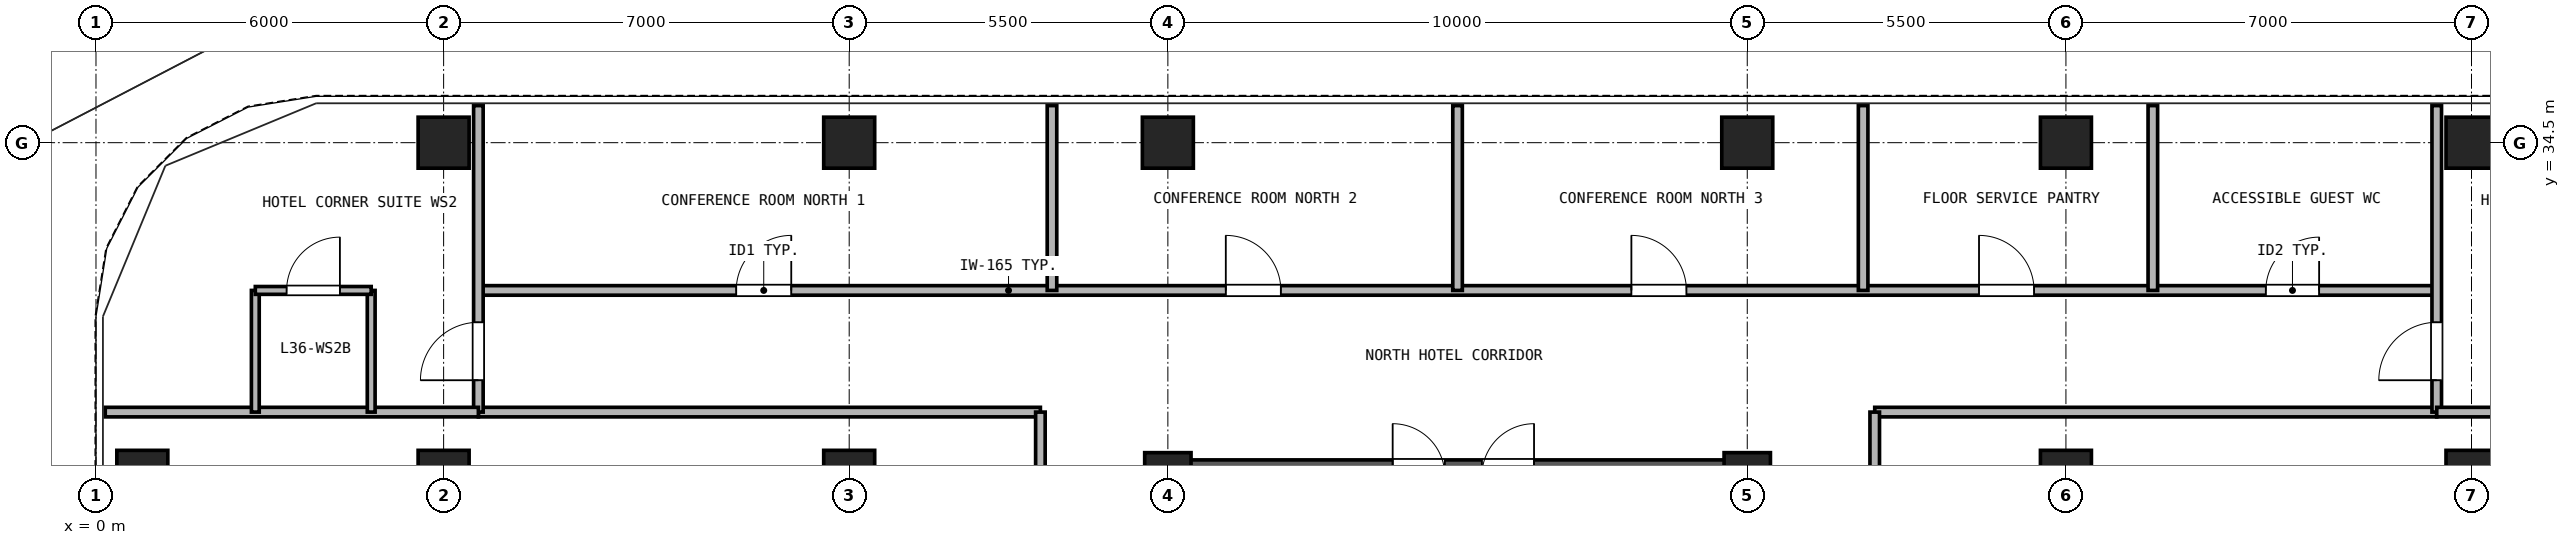
"""IFC4 building model, lengths in metres.
Left out: names, types, materials, properties, quantities, classifications, styles, units other than length and angle.
Written with IfcOpenShell. Run it as: python <this file> out.ifc"""

import sys

from ifc_helpers import new_model, si_unit, direction, frame, frame_2d, origin, origin_2d, place, context, subcontext, project, spatial, rectangle, hollow_rectangle, extrude, source, transform, mapped, element, fill, save


model = new_model("IFC4")
c1 = context("Model", 3, precision=1e-05, world=origin(), true_north=direction((0.0, 1.0)))
c2 = subcontext(c1, "Body", "Model", "MODEL_VIEW")
j1 = project(units=[si_unit("LENGTHUNIT", "METRE"), si_unit("PLANEANGLEUNIT", "RADIAN")], contexts=[c1])
p1 = place(None, origin())
s1 = spatial("IfcSite", under=j1, at=p1, CompositionType="ELEMENT")
p2 = place(p1, origin())
s2 = spatial("IfcBuilding", under=s1, at=p2, CompositionType="ELEMENT")
p3 = place(p2, frame((0.0, 0.0, 131.1)))
s3 = spatial("IfcBuildingStorey", under=s2, at=p3, CompositionType="ELEMENT", Elevation=131.1)
m1 = source(origin(), c2, "Body", "SweptSolid", [
    extrude(hollow_rectangle(XDim=0.88, YDim=0.88, WallThickness=0.05, at=origin_2d()), origin(), (0.0, 0.0, 1.0), 2.95),
])
for number, where, z_axis, x_axis in (
    (1, (6.0, 34.5, 0.0), (0.0, 0.0, 1.0), (1.0, 0.0, 0.0)),
    (2, (13.0, 34.5, 0.0), (0.0, 0.0, 1.0), (1.0, 0.0, 0.0)),
    (3, (18.5, 34.5, 0.0), (0.0, 0.0, 1.0), (1.0, 0.0, 0.0)),
    (4, (28.5, 34.5, 0.0), (0.0, 0.0, 1.0), (1.0, 0.0, 0.0)),
    (5, (34.0, 34.5, 0.0), (0.0, 0.0, 1.0), (1.0, 0.0, 0.0)),
    (6, (41.0, 34.5, 0.0), (0.0, 0.0, 1.0), (1.0, 0.0, 0.0)),
    (7, (0.8, 28.75, 0.0), (0.0, 0.0, 1.0), (1.0, 0.0, 0.0)),
    (8, (6.0, 28.75, 0.0), (0.0, 0.0, 1.0), (1.0, 0.0, 0.0)),
    (9, (13.0, 28.75, 0.0), (0.0, 0.0, 1.0), (1.0, 0.0, 0.0)),
):
    element("IfcColumn", number, at=place(p3, frame(where, z_axis=z_axis, x_axis=x_axis)), inside=s3, PredefinedType="COLUMN", context=c2, shape_type="MappedRepresentation", body=[
        mapped(m1, transform((0.0, 0.0, 0.0), x_axis=(1.0, 0.0, 0.0), y_axis=(0.0, 1.0, 0.0), z_axis=(0.0, 0.0, 1.0), scale=1.0)),
    ])
m2 = source(origin(), c2, "Body", "SweptSolid", [
    extrude(hollow_rectangle(XDim=0.8, YDim=0.8, WallThickness=0.045, at=origin_2d()), origin(), (0.0, 0.0, 1.0), 2.95),
])
for number, where, z_axis, x_axis in (
    (10, (18.5, 28.75, 0.0), (0.0, 0.0, 1.0), (1.0, 0.0, 0.0)),
    (11, (28.5, 28.75, 0.0), (0.0, 0.0, 1.0), (1.0, 0.0, 0.0)),
):
    element("IfcColumn", number, at=place(p3, frame(where, z_axis=z_axis, x_axis=x_axis)), inside=s3, PredefinedType="COLUMN", context=c2, shape_type="MappedRepresentation", body=[
        mapped(m2, transform((0.0, 0.0, 0.0), x_axis=(1.0, 0.0, 0.0), y_axis=(0.0, 1.0, 0.0), z_axis=(0.0, 0.0, 1.0), scale=1.0)),
    ])
for number, where, z_axis, x_axis in (
    (12, (34.0, 28.75, 0.0), (0.0, 0.0, 1.0), (1.0, 0.0, 0.0)),
    (13, (41.0, 28.75, 0.0), (0.0, 0.0, 1.0), (1.0, 0.0, 0.0)),
):
    element("IfcColumn", number, at=place(p3, frame(where, z_axis=z_axis, x_axis=x_axis)), inside=s3, PredefinedType="COLUMN", context=c2, shape_type="MappedRepresentation", body=[
        mapped(m1, transform((0.0, 0.0, 0.0), x_axis=(1.0, 0.0, 0.0), y_axis=(0.0, 1.0, 0.0), z_axis=(0.0, 0.0, 1.0), scale=1.0)),
    ])
p4 = place(p3, frame((18.225, 28.75, 0.0), z_axis=(0.0, 0.0, 1.0), x_axis=(1.0, 0.0, 0.0)))
e14 = element("IfcWall", 14, at=p4, inside=s3, PredefinedType="SHEAR", context=c2, shape_type="SweptSolid", body=[
    extrude(rectangle(XDim=10.55, YDim=0.55, at=frame_2d((5.275, 0.0))), origin(), (0.0, 0.0, 1.0), 2.95),
])
p5 = place(p4, frame((4.155, 0.0, 0.0)))
e15 = element("IfcOpeningElement", 15, at=p5, cuts=e14, PredefinedType="OPENING", context=c2, shape_type="SweptSolid", body=[
    extrude(rectangle(XDim=0.9, YDim=2.05, at=frame_2d((0.45, 1.025))), frame((0.0, 0.285, 0.0), z_axis=(0.0, -1.0, 0.0), x_axis=(1.0, 0.0, 0.0)), (0.0, 0.0, 1.0), 0.57),
])
p6 = place(p4, frame((5.695, 0.0, 0.0)))
e16 = element("IfcOpeningElement", 16, at=p6, cuts=e14, PredefinedType="OPENING", context=c2, shape_type="SweptSolid", body=[
    extrude(rectangle(XDim=0.9, YDim=2.05, at=frame_2d((0.45, 1.025))), frame((0.0, 0.285, 0.0), z_axis=(0.0, -1.0, 0.0), x_axis=(1.0, 0.0, 0.0)), (0.0, 0.0, 1.0), 0.57),
])
p7 = place(p3, frame((6.6, 31.95, 0.0), z_axis=(0.0, 0.0, 1.0), x_axis=(1.0, 0.0, 0.0)))
e17 = element("IfcWall", 17, at=p7, inside=s3, PredefinedType="PARTITIONING", context=c2, shape_type="SweptSolid", body=[
    extrude(rectangle(XDim=33.8, YDim=0.165, at=frame_2d((16.9, 0.0))), origin(), (0.0, 0.0, 1.0), 2.95),
])
p8 = place(p7, frame((4.45, 0.0, 0.0)))
e18 = element("IfcOpeningElement", 18, at=p8, cuts=e17, PredefinedType="OPENING", context=c2, shape_type="SweptSolid", body=[
    extrude(rectangle(XDim=0.95, YDim=2.15, at=frame_2d((0.475, 1.075))), frame((0.0, 0.093, 0.0), z_axis=(0.0, -1.0, 0.0), x_axis=(1.0, 0.0, 0.0)), (0.0, 0.0, 1.0), 0.185),
])
p9 = place(p7, frame((12.9, 0.0, 0.0)))
e19 = element("IfcOpeningElement", 19, at=p9, cuts=e17, PredefinedType="OPENING", context=c2, shape_type="SweptSolid", body=[
    extrude(rectangle(XDim=0.95, YDim=2.15, at=frame_2d((0.475, 1.075))), frame((0.0, 0.093, 0.0), z_axis=(0.0, -1.0, 0.0), x_axis=(1.0, 0.0, 0.0)), (0.0, 0.0, 1.0), 0.185),
])
p10 = place(p7, frame((19.9, 0.0, 0.0)))
e20 = element("IfcOpeningElement", 20, at=p10, cuts=e17, PredefinedType="OPENING", context=c2, shape_type="SweptSolid", body=[
    extrude(rectangle(XDim=0.95, YDim=2.15, at=frame_2d((0.475, 1.075))), frame((0.0, 0.093, 0.0), z_axis=(0.0, -1.0, 0.0), x_axis=(1.0, 0.0, 0.0)), (0.0, 0.0, 1.0), 0.185),
])
p11 = place(p7, frame((25.9, 0.0, 0.0)))
e21 = element("IfcOpeningElement", 21, at=p11, cuts=e17, PredefinedType="OPENING", context=c2, shape_type="SweptSolid", body=[
    extrude(rectangle(XDim=0.95, YDim=2.15, at=frame_2d((0.475, 1.075))), frame((0.0, 0.093, 0.0), z_axis=(0.0, -1.0, 0.0), x_axis=(1.0, 0.0, 0.0)), (0.0, 0.0, 1.0), 0.185),
])
p12 = place(p7, frame((30.85, 0.0, 0.0)))
e22 = element("IfcOpeningElement", 22, at=p12, cuts=e17, PredefinedType="OPENING", context=c2, shape_type="SweptSolid", body=[
    extrude(rectangle(XDim=0.92, YDim=2.1, at=frame_2d((0.46, 1.05))), frame((0.0, 0.093, 0.0), z_axis=(0.0, -1.0, 0.0), x_axis=(1.0, 0.0, 0.0)), (0.0, 0.0, 1.0), 0.185),
])
for number, where, z_axis, x_axis in (
    (23, (6.6, 29.85, 0.0), (0.0, 0.0, 1.0), (1.0, 0.0, 0.0)),
    (24, (30.7, 29.85, 0.0), (0.0, 0.0, 1.0), (1.0, 0.0, 0.0)),
):
    element("IfcWall", number, at=place(p3, frame(where, z_axis=z_axis, x_axis=x_axis)), inside=s3, PredefinedType="PARTITIONING", context=c2, shape_type="SweptSolid", body=[
        extrude(rectangle(XDim=9.7, YDim=0.165, at=frame_2d((4.85, 0.0))), origin(), (0.0, 0.0, 1.0), 2.95),
    ])
p13 = place(p3, frame((16.3, 11.15, 0.0), z_axis=(0.0, 0.0, 1.0), x_axis=(0.0, 1.0, 0.0)))
e25 = element("IfcWall", 25, at=p13, inside=s3, PredefinedType="PARTITIONING", context=c2, shape_type="SweptSolid", body=[
    extrude(rectangle(XDim=18.7, YDim=0.165, at=frame_2d((9.35, 0.0))), origin(), (0.0, 0.0, 1.0), 2.95),
])
p14 = place(p13, frame((2.75, 0.0, 0.0)))
e26 = element("IfcOpeningElement", 26, at=p14, cuts=e25, PredefinedType="OPENING", context=c2, shape_type="SweptSolid", body=[
    extrude(rectangle(XDim=0.95, YDim=2.15, at=frame_2d((0.475, 1.075))), frame((0.0, 0.093, 0.0), z_axis=(0.0, -1.0, 0.0), x_axis=(1.0, 0.0, 0.0)), (0.0, 0.0, 1.0), 0.185),
])
p15 = place(p13, frame((12.1, 0.0, 0.0)))
e27 = element("IfcOpeningElement", 27, at=p15, cuts=e25, PredefinedType="OPENING", context=c2, shape_type="SweptSolid", body=[
    extrude(rectangle(XDim=0.95, YDim=2.15, at=frame_2d((0.475, 1.075))), frame((0.0, 0.093, 0.0), z_axis=(0.0, -1.0, 0.0), x_axis=(1.0, 0.0, 0.0)), (0.0, 0.0, 1.0), 0.185),
])
p16 = place(p3, frame((30.7, 11.15, 0.0), z_axis=(0.0, 0.0, 1.0), x_axis=(0.0, 1.0, 0.0)))
e28 = element("IfcWall", 28, at=p16, inside=s3, PredefinedType="PARTITIONING", context=c2, shape_type="SweptSolid", body=[
    extrude(rectangle(XDim=18.7, YDim=0.165, at=frame_2d((9.35, 0.0))), origin(), (0.0, 0.0, 1.0), 2.95),
])
p17 = place(p16, frame((4.175, 0.0, 0.0)))
e29 = element("IfcOpeningElement", 29, at=p17, cuts=e28, PredefinedType="OPENING", context=c2, shape_type="SweptSolid", body=[
    extrude(rectangle(XDim=0.95, YDim=2.15, at=frame_2d((0.475, 1.075))), frame((0.0, 0.093, 0.0), z_axis=(0.0, -1.0, 0.0), x_axis=(1.0, 0.0, 0.0)), (0.0, 0.0, 1.0), 0.185),
])
p18 = place(p16, frame((13.525, 0.0, 0.0)))
e30 = element("IfcOpeningElement", 30, at=p18, cuts=e28, PredefinedType="OPENING", context=c2, shape_type="SweptSolid", body=[
    extrude(rectangle(XDim=0.95, YDim=2.15, at=frame_2d((0.475, 1.075))), frame((0.0, 0.093, 0.0), z_axis=(0.0, -1.0, 0.0), x_axis=(1.0, 0.0, 0.0)), (0.0, 0.0, 1.0), 0.185),
])
p19 = place(p3, frame((6.6, 29.85, 0.0), z_axis=(0.0, 0.0, 1.0), x_axis=(0.0, 1.0, 0.0)))
e31 = element("IfcWall", 31, at=p19, inside=s3, PredefinedType="PARTITIONING", context=c2, shape_type="SweptSolid", body=[
    extrude(rectangle(XDim=5.29, YDim=0.165, at=frame_2d((2.645, 0.0))), origin(), (0.0, 0.0, 1.0), 2.95),
])
p20 = place(p19, frame((0.55, 0.0, 0.0)))
e32 = element("IfcOpeningElement", 32, at=p20, cuts=e31, PredefinedType="OPENING", context=c2, shape_type="SweptSolid", body=[
    extrude(rectangle(XDim=1.0, YDim=2.15, at=frame_2d((0.5, 1.075))), frame((0.0, 0.093, 0.0), z_axis=(0.0, -1.0, 0.0), x_axis=(1.0, 0.0, 0.0)), (0.0, 0.0, 1.0), 0.185),
])
p21 = place(p3, frame((40.4, 29.85, 0.0), z_axis=(0.0, 0.0, 1.0), x_axis=(0.0, 1.0, 0.0)))
e33 = element("IfcWall", 33, at=p21, inside=s3, PredefinedType="PARTITIONING", context=c2, shape_type="SweptSolid", body=[
    extrude(rectangle(XDim=5.29, YDim=0.165, at=frame_2d((2.645, 0.0))), origin(), (0.0, 0.0, 1.0), 2.95),
])
p22 = place(p21, frame((0.55, 0.0, 0.0)))
e34 = element("IfcOpeningElement", 34, at=p22, cuts=e33, PredefinedType="OPENING", context=c2, shape_type="SweptSolid", body=[
    extrude(rectangle(XDim=1.0, YDim=2.15, at=frame_2d((0.5, 1.075))), frame((0.0, 0.093, 0.0), z_axis=(0.0, -1.0, 0.0), x_axis=(1.0, 0.0, 0.0)), (0.0, 0.0, 1.0), 0.185),
])
for number, where, z_axis, x_axis in (
    (35, (0.16, 29.85, 0.0), (0.0, 0.0, 1.0), (1.0, 0.0, 0.0)),
    (36, (40.4, 29.85, 0.0), (0.0, 0.0, 1.0), (1.0, 0.0, 0.0)),
):
    element("IfcWall", number, at=place(p3, frame(where, z_axis=z_axis, x_axis=x_axis)), inside=s3, PredefinedType="PARTITIONING", context=c2, shape_type="SweptSolid", body=[
        extrude(rectangle(XDim=6.44, YDim=0.165, at=frame_2d((3.22, 0.0))), origin(), (0.0, 0.0, 1.0), 2.95),
    ])
for number, where, z_axis, x_axis in (
    (37, (2.75, 29.85, 0.0), (0.0, 0.0, 1.0), (0.0, 1.0, 0.0)),
    (38, (4.75, 29.85, 0.0), (0.0, 0.0, 1.0), (0.0, 1.0, 0.0)),
):
    element("IfcWall", number, at=place(p3, frame(where, z_axis=z_axis, x_axis=x_axis)), inside=s3, PredefinedType="PARTITIONING", context=c2, shape_type="SweptSolid", body=[
        extrude(rectangle(XDim=2.1, YDim=0.135, at=frame_2d((1.05, 0.0))), origin(), (0.0, 0.0, 1.0), 2.95),
    ])
p23 = place(p3, frame((2.75, 31.95, 0.0), z_axis=(0.0, 0.0, 1.0), x_axis=(1.0, 0.0, 0.0)))
e39 = element("IfcWall", 39, at=p23, inside=s3, PredefinedType="PARTITIONING", context=c2, shape_type="SweptSolid", body=[
    extrude(rectangle(XDim=2.0, YDim=0.135, at=frame_2d((1.0, 0.0))), origin(), (0.0, 0.0, 1.0), 2.95),
])
p24 = place(p23, frame((0.54, 0.0, 0.0)))
e40 = element("IfcOpeningElement", 40, at=p24, cuts=e39, PredefinedType="OPENING", context=c2, shape_type="SweptSolid", body=[
    extrude(rectangle(XDim=0.92, YDim=2.1, at=frame_2d((0.46, 1.05))), frame((0.0, 0.077, 0.0), z_axis=(0.0, -1.0, 0.0), x_axis=(1.0, 0.0, 0.0)), (0.0, 0.0, 1.0), 0.155),
])
for number, where, z_axis, x_axis in (
    (41, (16.5, 31.95, 0.0), (0.0, 0.0, 1.0), (0.0, 1.0, 0.0)),
    (42, (23.5, 31.95, 0.0), (0.0, 0.0, 1.0), (0.0, 1.0, 0.0)),
    (43, (30.5, 31.95, 0.0), (0.0, 0.0, 1.0), (0.0, 1.0, 0.0)),
    (44, (35.5, 31.95, 0.0), (0.0, 0.0, 1.0), (0.0, 1.0, 0.0)),
):
    element("IfcWall", number, at=place(p3, frame(where, z_axis=z_axis, x_axis=x_axis)), inside=s3, PredefinedType="PARTITIONING", context=c2, shape_type="SweptSolid", body=[
        extrude(rectangle(XDim=3.19, YDim=0.165, at=frame_2d((1.595, 0.0))), origin(), (0.0, 0.0, 1.0), 2.95),
    ])
p25 = place(p24, frame((0.92, 0.0, 0.0), z_axis=(0.0, 0.0, 1.0), x_axis=(-1.0, 0.0, 0.0)))
e45 = element("IfcDoor", 45, at=p25, inside=s3, OperationType="SINGLE_SWING_RIGHT", PredefinedType="DOOR", context=c2, shape_type="SweptSolid", body=[
    extrude(rectangle(XDim=0.92, YDim=2.1, at=frame_2d((0.46, 1.05))), frame((0.0, 0.025, 0.0), z_axis=(0.0, -1.0, 0.0), x_axis=(1.0, 0.0, 0.0)), (0.0, 0.0, 1.0), 0.05),
])
fill(e40, e45)
p26 = place(p20, origin())
e46 = element("IfcDoor", 46, at=p26, inside=s3, OperationType="SINGLE_SWING_LEFT", PredefinedType="DOOR", context=c2, shape_type="SweptSolid", body=[
    extrude(rectangle(XDim=1.0, YDim=2.15, at=frame_2d((0.5, 1.075))), frame((0.0, 0.025, 0.0), z_axis=(0.0, -1.0, 0.0), x_axis=(1.0, 0.0, 0.0)), (0.0, 0.0, 1.0), 0.05),
])
fill(e32, e46)
p27 = place(p22, frame((1.0, 0.0, 0.0), z_axis=(0.0, 0.0, 1.0), x_axis=(-1.0, 0.0, 0.0)))
e47 = element("IfcDoor", 47, at=p27, inside=s3, OperationType="SINGLE_SWING_LEFT", PredefinedType="DOOR", context=c2, shape_type="SweptSolid", body=[
    extrude(rectangle(XDim=1.0, YDim=2.15, at=frame_2d((0.5, 1.075))), frame((0.0, 0.025, 0.0), z_axis=(0.0, -1.0, 0.0), x_axis=(1.0, 0.0, 0.0)), (0.0, 0.0, 1.0), 0.05),
])
fill(e34, e47)
p28 = place(p8, origin())
e48 = element("IfcDoor", 48, at=p28, inside=s3, OperationType="SINGLE_SWING_RIGHT", PredefinedType="DOOR", context=c2, shape_type="SweptSolid", body=[
    extrude(rectangle(XDim=0.95, YDim=2.15, at=frame_2d((0.475, 1.075))), frame((0.0, 0.025, 0.0), z_axis=(0.0, -1.0, 0.0), x_axis=(1.0, 0.0, 0.0)), (0.0, 0.0, 1.0), 0.05),
])
fill(e18, e48)
p29 = place(p9, origin())
e49 = element("IfcDoor", 49, at=p29, inside=s3, OperationType="SINGLE_SWING_LEFT", PredefinedType="DOOR", context=c2, shape_type="SweptSolid", body=[
    extrude(rectangle(XDim=0.95, YDim=2.15, at=frame_2d((0.475, 1.075))), frame((0.0, 0.025, 0.0), z_axis=(0.0, -1.0, 0.0), x_axis=(1.0, 0.0, 0.0)), (0.0, 0.0, 1.0), 0.05),
])
fill(e19, e49)
p30 = place(p10, origin())
e50 = element("IfcDoor", 50, at=p30, inside=s3, OperationType="SINGLE_SWING_LEFT", PredefinedType="DOOR", context=c2, shape_type="SweptSolid", body=[
    extrude(rectangle(XDim=0.95, YDim=2.15, at=frame_2d((0.475, 1.075))), frame((0.0, 0.025, 0.0), z_axis=(0.0, -1.0, 0.0), x_axis=(1.0, 0.0, 0.0)), (0.0, 0.0, 1.0), 0.05),
])
fill(e20, e50)
p31 = place(p11, origin())
e51 = element("IfcDoor", 51, at=p31, inside=s3, OperationType="SINGLE_SWING_LEFT", PredefinedType="DOOR", context=c2, shape_type="SweptSolid", body=[
    extrude(rectangle(XDim=0.95, YDim=2.15, at=frame_2d((0.475, 1.075))), frame((0.0, 0.025, 0.0), z_axis=(0.0, -1.0, 0.0), x_axis=(1.0, 0.0, 0.0)), (0.0, 0.0, 1.0), 0.05),
])
fill(e21, e51)
p32 = place(p12, origin())
e52 = element("IfcDoor", 52, at=p32, inside=s3, OperationType="SINGLE_SWING_RIGHT", PredefinedType="DOOR", context=c2, shape_type="SweptSolid", body=[
    extrude(rectangle(XDim=0.92, YDim=2.1, at=frame_2d((0.46, 1.05))), frame((0.0, 0.025, 0.0), z_axis=(0.0, -1.0, 0.0), x_axis=(1.0, 0.0, 0.0)), (0.0, 0.0, 1.0), 0.05),
])
fill(e22, e52)
save(model, sys.argv[1])
